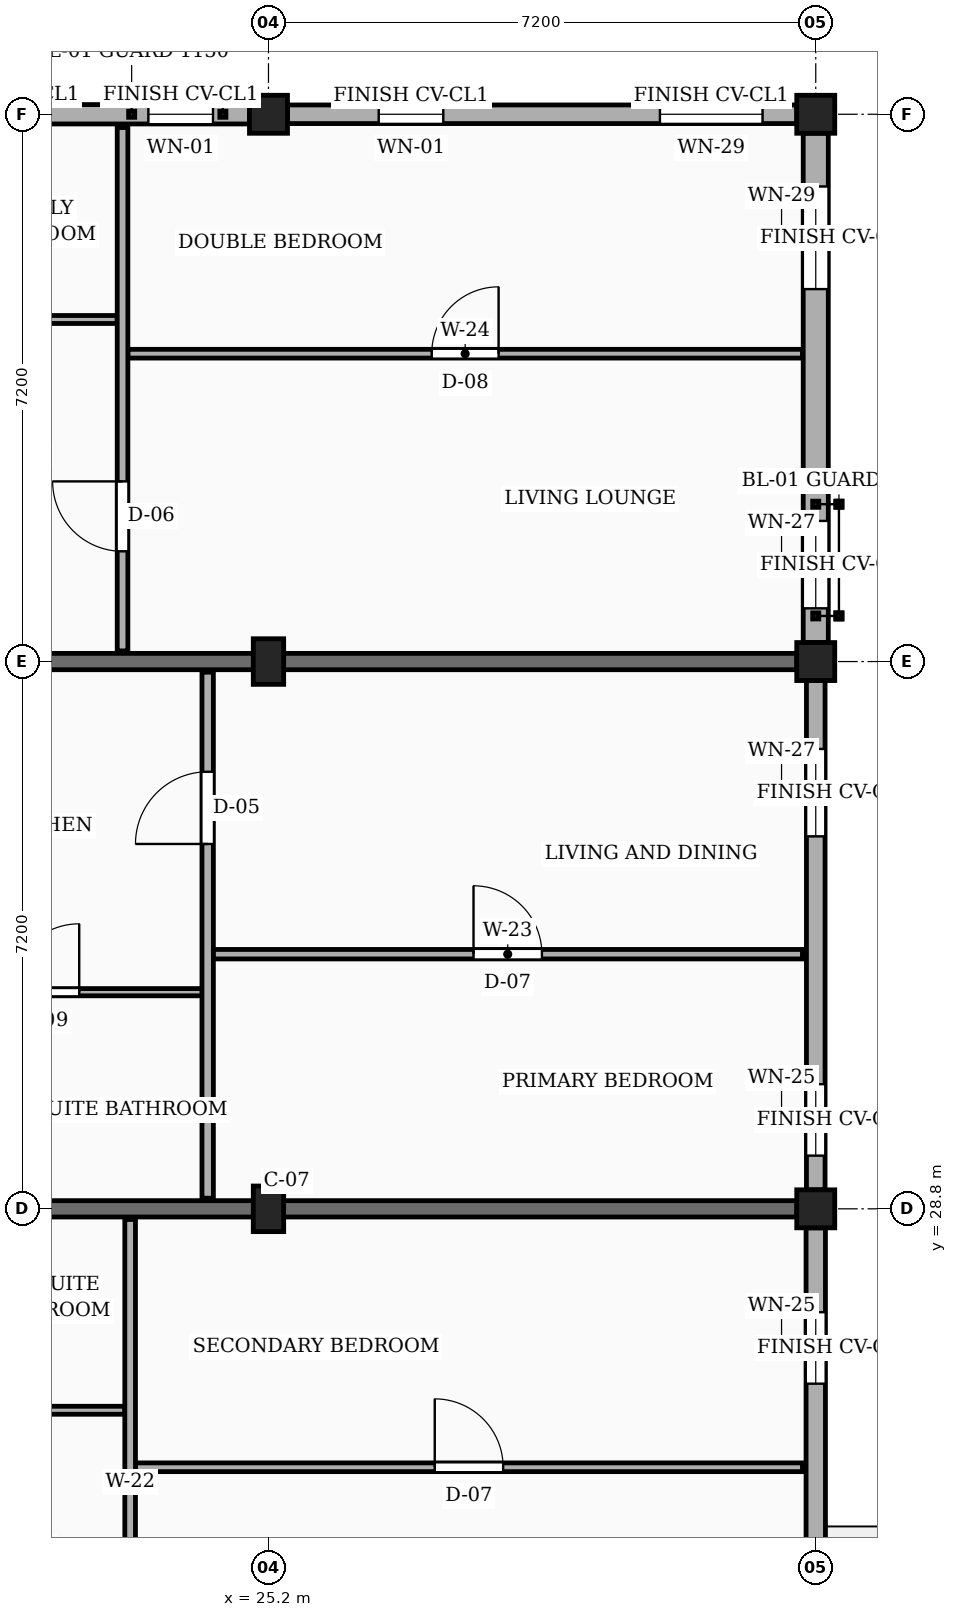
"""IFC4 building model, lengths in metres.
Left out: names, types, materials, properties, quantities, classifications, styles, units other than length and angle.
Written with IfcOpenShell. Run it as: python <this file> out.ifc"""

import sys

from ifc_helpers import new_model, si_unit, direction, frame, frame_2d, origin, origin_2d, place, context, subcontext, project, spatial, rectangle, extrude, element, fill, save


model = new_model("IFC4")
c1 = context("Model", 3, precision=1e-05, world=origin(), true_north=direction((0.0, 1.0)))
c2 = subcontext(c1, "Body", "Model", "MODEL_VIEW")
j1 = project(units=[si_unit("LENGTHUNIT", "METRE"), si_unit("PLANEANGLEUNIT", "RADIAN")], contexts=[c1])
p1 = place(None, origin())
s1 = spatial("IfcSite", under=j1, at=p1, CompositionType="ELEMENT")
p2 = place(p1, origin())
s2 = spatial("IfcBuilding", under=s1, at=p2, CompositionType="ELEMENT")
p3 = place(p2, frame((0.0, 0.0, 32.85)))
s3 = spatial("IfcBuildingStorey", under=s2, at=p3, CompositionType="ELEMENT", Elevation=32.85)
for number, where, z_axis, x_axis in (
    (1, (25.2, 28.8, 0.0), (0.0, 0.0, 1.0), (1.0, 0.0, 0.0)),
    (2, (25.2, 36.0, 0.0), (0.0, 0.0, 1.0), (1.0, 0.0, 0.0)),
):
    element("IfcColumn", number, at=place(p3, frame(where, z_axis=z_axis, x_axis=x_axis)), inside=s3, PredefinedType="COLUMN", context=c2, shape_type="SweptSolid", body=[
        extrude(rectangle(XDim=0.4, YDim=0.6, at=origin_2d()), origin(), (0.0, 0.0, 1.0), 3.15),
    ])
for number, where, z_axis, x_axis in (
    (3, (25.2, 43.2, 0.0), (0.0, 0.0, 1.0), (1.0, 0.0, 0.0)),
    (4, (32.4, 28.8, 0.0), (0.0, 0.0, 1.0), (1.0, 0.0, 0.0)),
    (5, (32.4, 36.0, 0.0), (0.0, 0.0, 1.0), (1.0, 0.0, 0.0)),
    (6, (32.4, 43.2, 0.0), (0.0, 0.0, 1.0), (1.0, 0.0, 0.0)),
):
    element("IfcColumn", number, at=place(p3, frame(where, z_axis=z_axis, x_axis=x_axis)), inside=s3, PredefinedType="COLUMN", context=c2, shape_type="SweptSolid", body=[
        extrude(rectangle(XDim=0.5, YDim=0.5, at=origin_2d()), origin(), (0.0, 0.0, 1.0), 3.15),
    ])
for number, where, z_axis, x_axis in (
    (7, (20.1, 28.8, 0.0), (0.0, 0.0, 1.0), (1.0, 0.0, 0.0)),
    (8, (20.1, 36.0, 0.0), (0.0, 0.0, 1.0), (1.0, 0.0, 0.0)),
):
    element("IfcWall", number, at=place(p3, frame(where, z_axis=z_axis, x_axis=x_axis)), inside=s3, PredefinedType="SOLIDWALL", context=c2, shape_type="SweptSolid", body=[
        extrude(rectangle(XDim=12.05, YDim=0.215, at=frame_2d((6.025, 0.0))), origin(), (0.0, 0.0, 1.0), 2.17),
    ])
p4 = place(p3, frame((32.4, 21.85, 0.0), z_axis=(0.0, 0.0, 1.0), x_axis=(0.0, 1.0, 0.0)))
e9 = element("IfcWall", 9, at=p4, inside=s3, PredefinedType="SOLIDWALL", context=c2, shape_type="SweptSolid", body=[
    extrude(rectangle(XDim=6.7, YDim=0.255, at=frame_2d((3.35, 0.0))), origin(), (0.0, 0.0, 1.0), 2.44),
])
p5 = place(p4, frame((0.45, 0.0, 0.78)))
e10 = element("IfcOpeningElement", 10, at=p5, cuts=e9, PredefinedType="OPENING", context=c2, shape_type="SweptSolid", body=[
    extrude(rectangle(XDim=1.38, YDim=1.36, at=frame_2d((0.69, 0.68))), frame((0.0, 0.137, 0.0), z_axis=(0.0, -1.0, 0.0), x_axis=(1.0, 0.0, 0.0)), (0.0, 0.0, 1.0), 0.275),
])
p6 = place(p4, frame((4.65, 0.0, 0.78)))
e11 = element("IfcOpeningElement", 11, at=p6, cuts=e9, PredefinedType="OPENING", context=c2, shape_type="SweptSolid", body=[
    extrude(rectangle(XDim=0.94, YDim=1.44, at=frame_2d((0.47, 0.72))), frame((0.0, 0.137, 0.0), z_axis=(0.0, -1.0, 0.0), x_axis=(1.0, 0.0, 0.0)), (0.0, 0.0, 1.0), 0.275),
])
p7 = place(p3, frame((32.4, 29.05, 0.0), z_axis=(0.0, 0.0, 1.0), x_axis=(0.0, 1.0, 0.0)))
e12 = element("IfcWall", 12, at=p7, inside=s3, PredefinedType="SOLIDWALL", context=c2, shape_type="SweptSolid", body=[
    extrude(rectangle(XDim=6.7, YDim=0.245, at=frame_2d((3.35, 0.0))), origin(), (0.0, 0.0, 1.0), 2.44),
])
p8 = place(p7, frame((0.45, 0.0, 0.78)))
e13 = element("IfcOpeningElement", 13, at=p8, cuts=e12, PredefinedType="OPENING", context=c2, shape_type="SweptSolid", body=[
    extrude(rectangle(XDim=0.94, YDim=1.44, at=frame_2d((0.47, 0.72))), frame((0.0, 0.133, 0.0), z_axis=(0.0, -1.0, 0.0), x_axis=(1.0, 0.0, 0.0)), (0.0, 0.0, 1.0), 0.265),
])
p9 = place(p7, frame((4.65, 0.0, 0.78)))
e14 = element("IfcOpeningElement", 14, at=p9, cuts=e12, PredefinedType="OPENING", context=c2, shape_type="SweptSolid", body=[
    extrude(rectangle(XDim=1.15, YDim=1.44, at=frame_2d((0.575, 0.72))), frame((0.0, 0.133, 0.0), z_axis=(0.0, -1.0, 0.0), x_axis=(1.0, 0.0, 0.0)), (0.0, 0.0, 1.0), 0.265),
])
p10 = place(p3, frame((32.4, 36.25, 0.0), z_axis=(0.0, 0.0, 1.0), x_axis=(0.0, 1.0, 0.0)))
e15 = element("IfcWall", 15, at=p10, inside=s3, PredefinedType="SOLIDWALL", context=c2, shape_type="SweptSolid", body=[
    extrude(rectangle(XDim=6.7, YDim=0.33, at=frame_2d((3.35, 0.0))), origin(), (0.0, 0.0, 1.0), 2.44),
])
p11 = place(p10, frame((0.45, 0.0, 0.78)))
e16 = element("IfcOpeningElement", 16, at=p11, cuts=e15, PredefinedType="OPENING", context=c2, shape_type="SweptSolid", body=[
    extrude(rectangle(XDim=1.15, YDim=1.44, at=frame_2d((0.575, 0.72))), frame((0.0, 0.175, 0.0), z_axis=(0.0, -1.0, 0.0), x_axis=(1.0, 0.0, 0.0)), (0.0, 0.0, 1.0), 0.35),
])
p12 = place(p10, frame((4.65, 0.0, 0.78)))
e17 = element("IfcOpeningElement", 17, at=p12, cuts=e15, PredefinedType="OPENING", context=c2, shape_type="SweptSolid", body=[
    extrude(rectangle(XDim=1.35, YDim=1.44, at=frame_2d((0.675, 0.72))), frame((0.0, 0.175, 0.0), z_axis=(0.0, -1.0, 0.0), x_axis=(1.0, 0.0, 0.0)), (0.0, 0.0, 1.0), 0.35),
])
p13 = place(p3, frame((32.15, 43.2, 0.0), z_axis=(0.0, 0.0, 1.0), x_axis=(-1.0, 0.0, 0.0)))
e18 = element("IfcWall", 18, at=p13, inside=s3, PredefinedType="SOLIDWALL", context=c2, shape_type="SweptSolid", body=[
    extrude(rectangle(XDim=6.7, YDim=0.245, at=frame_2d((3.35, 0.0))), origin(), (0.0, 0.0, 1.0), 2.44),
])
p14 = place(p13, frame((0.45, 0.0, 0.78)))
e19 = element("IfcOpeningElement", 19, at=p14, cuts=e18, PredefinedType="OPENING", context=c2, shape_type="SweptSolid", body=[
    extrude(rectangle(XDim=1.35, YDim=1.44, at=frame_2d((0.675, 0.72))), frame((0.0, 0.133, 0.0), z_axis=(0.0, -1.0, 0.0), x_axis=(1.0, 0.0, 0.0)), (0.0, 0.0, 1.0), 0.265),
])
p15 = place(p13, frame((4.65, 0.0, 0.78)))
e20 = element("IfcOpeningElement", 20, at=p15, cuts=e18, PredefinedType="OPENING", context=c2, shape_type="SweptSolid", body=[
    extrude(rectangle(XDim=0.85, YDim=1.15, at=frame_2d((0.425, 0.575))), frame((0.0, 0.133, 0.0), z_axis=(0.0, -1.0, 0.0), x_axis=(1.0, 0.0, 0.0)), (0.0, 0.0, 1.0), 0.265),
])
p16 = place(p3, frame((24.95, 43.2, 0.0), z_axis=(0.0, 0.0, 1.0), x_axis=(-1.0, 0.0, 0.0)))
e21 = element("IfcWall", 21, at=p16, inside=s3, PredefinedType="SOLIDWALL", context=c2, shape_type="SweptSolid", body=[
    extrude(rectangle(XDim=6.7, YDim=0.255, at=frame_2d((3.35, 0.0))), origin(), (0.0, 0.0, 1.0), 2.44),
])
p17 = place(p16, frame((0.48, 0.0, 0.78)))
e22 = element("IfcOpeningElement", 22, at=p17, cuts=e21, PredefinedType="OPENING", context=c2, shape_type="SweptSolid", body=[
    extrude(rectangle(XDim=0.85, YDim=1.15, at=frame_2d((0.425, 0.575))), frame((0.0, 0.137, 0.0), z_axis=(0.0, -1.0, 0.0), x_axis=(1.0, 0.0, 0.0)), (0.0, 0.0, 1.0), 0.275),
])
p18 = place(p16, frame((2.76, 0.0, 0.78)))
e23 = element("IfcOpeningElement", 23, at=p18, cuts=e21, PredefinedType="OPENING", context=c2, shape_type="SweptSolid", body=[
    extrude(rectangle(XDim=1.0, YDim=1.15, at=frame_2d((0.5, 0.575))), frame((0.0, 0.137, 0.0), z_axis=(0.0, -1.0, 0.0), x_axis=(1.0, 0.0, 0.0)), (0.0, 0.0, 1.0), 0.275),
])
p19 = place(p16, frame((5.125, 0.0, 0.78)))
e24 = element("IfcOpeningElement", 24, at=p19, cuts=e21, PredefinedType="OPENING", context=c2, shape_type="SweptSolid", body=[
    extrude(rectangle(XDim=1.16, YDim=1.15, at=frame_2d((0.58, 0.575))), frame((0.0, 0.137, 0.0), z_axis=(0.0, -1.0, 0.0), x_axis=(1.0, 0.0, 0.0)), (0.0, 0.0, 1.0), 0.275),
])
p20 = place(p3, frame((23.45, 25.4, 0.0), z_axis=(0.0, 0.0, 1.0), x_axis=(1.0, 0.0, 0.0)))
e25 = element("IfcWall", 25, at=p20, inside=s3, PredefinedType="PARTITIONING", context=c2, shape_type="SweptSolid", body=[
    extrude(rectangle(XDim=8.775, YDim=0.115, at=frame_2d((4.388, 0.0))), origin(), (0.0, 0.0, 1.0), 2.305),
])
p21 = place(p20, frame((3.938, 0.0, 0.0)))
e26 = element("IfcOpeningElement", 26, at=p21, cuts=e25, PredefinedType="OPENING", context=c2, shape_type="SweptSolid", body=[
    extrude(rectangle(XDim=0.9, YDim=2.1, at=frame_2d((0.45, 1.05))), frame((0.0, 0.067, 0.0), z_axis=(0.0, -1.0, 0.0), x_axis=(1.0, 0.0, 0.0)), (0.0, 0.0, 1.0), 0.135),
])
p22 = place(p3, frame((20.19, 26.15, 0.0), z_axis=(0.0, 0.0, 1.0), x_axis=(1.0, 0.0, 0.0)))
e27 = element("IfcWall", 27, at=p22, inside=s3, PredefinedType="PARTITIONING", context=c2, shape_type="SweptSolid", body=[
    extrude(rectangle(XDim=3.12, YDim=0.105, at=frame_2d((1.56, 0.0))), origin(), (0.0, 0.0, 1.0), 2.305),
])
p23 = place(p22, frame((1.11, 0.0, 0.0)))
e28 = element("IfcOpeningElement", 28, at=p23, cuts=e27, PredefinedType="OPENING", context=c2, shape_type="SweptSolid", body=[
    extrude(rectangle(XDim=0.9, YDim=2.05, at=frame_2d((0.45, 1.025))), frame((0.0, 0.062, 0.0), z_axis=(0.0, -1.0, 0.0), x_axis=(1.0, 0.0, 0.0)), (0.0, 0.0, 1.0), 0.125),
])
p24 = place(p3, frame((23.38, 21.74, 0.0), z_axis=(0.0, 0.0, 1.0), x_axis=(0.0, 1.0, 0.0)))
e29 = element("IfcWall", 29, at=p24, inside=s3, PredefinedType="PARTITIONING", context=c2, shape_type="SweptSolid", body=[
    extrude(rectangle(XDim=6.92, YDim=0.14, at=frame_2d((3.46, 0.0))), origin(), (0.0, 0.0, 1.0), 2.305),
])
p25 = place(p24, frame((1.31, 0.0, 0.0)))
e30 = element("IfcOpeningElement", 30, at=p25, cuts=e29, PredefinedType="OPENING", context=c2, shape_type="SweptSolid", body=[
    extrude(rectangle(XDim=0.95, YDim=2.1, at=frame_2d((0.475, 1.05))), frame((0.0, 0.08, 0.0), z_axis=(0.0, -1.0, 0.0), x_axis=(1.0, 0.0, 0.0)), (0.0, 0.0, 1.0), 0.16),
])
p26 = place(p3, frame((24.47, 32.15, 0.0), z_axis=(0.0, 0.0, 1.0), x_axis=(1.0, 0.0, 0.0)))
e31 = element("IfcWall", 31, at=p26, inside=s3, PredefinedType="PARTITIONING", context=c2, shape_type="SweptSolid", body=[
    extrude(rectangle(XDim=7.755, YDim=0.125, at=frame_2d((3.877, 0.0))), origin(), (0.0, 0.0, 1.0), 2.305),
])
p27 = place(p26, frame((3.427, 0.0, 0.0)))
e32 = element("IfcOpeningElement", 32, at=p27, cuts=e31, PredefinedType="OPENING", context=c2, shape_type="SweptSolid", body=[
    extrude(rectangle(XDim=0.9, YDim=2.1, at=frame_2d((0.45, 1.05))), frame((0.0, 0.073, 0.0), z_axis=(0.0, -1.0, 0.0), x_axis=(1.0, 0.0, 0.0)), (0.0, 0.0, 1.0), 0.145),
])
p28 = place(p3, frame((20.19, 31.65, 0.0), z_axis=(0.0, 0.0, 1.0), x_axis=(1.0, 0.0, 0.0)))
e33 = element("IfcWall", 33, at=p28, inside=s3, PredefinedType="PARTITIONING", context=c2, shape_type="SweptSolid", body=[
    extrude(rectangle(XDim=4.14, YDim=0.095, at=frame_2d((2.07, 0.0))), origin(), (0.0, 0.0, 1.0), 2.305),
])
p29 = place(p28, frame((1.62, 0.0, 0.0)))
e34 = element("IfcOpeningElement", 34, at=p29, cuts=e33, PredefinedType="OPENING", context=c2, shape_type="SweptSolid", body=[
    extrude(rectangle(XDim=0.9, YDim=2.05, at=frame_2d((0.45, 1.025))), frame((0.0, 0.058, 0.0), z_axis=(0.0, -1.0, 0.0), x_axis=(1.0, 0.0, 0.0)), (0.0, 0.0, 1.0), 0.115),
])
p30 = place(p3, frame((24.4, 28.94, 0.0), z_axis=(0.0, 0.0, 1.0), x_axis=(0.0, 1.0, 0.0)))
e35 = element("IfcWall", 35, at=p30, inside=s3, PredefinedType="PARTITIONING", context=c2, shape_type="SweptSolid", body=[
    extrude(rectangle(XDim=6.92, YDim=0.15, at=frame_2d((3.46, 0.0))), origin(), (0.0, 0.0, 1.0), 2.305),
])
p31 = place(p30, frame((4.66, 0.0, 0.0)))
e36 = element("IfcOpeningElement", 36, at=p31, cuts=e35, PredefinedType="OPENING", context=c2, shape_type="SweptSolid", body=[
    extrude(rectangle(XDim=0.95, YDim=2.1, at=frame_2d((0.475, 1.05))), frame((0.0, 0.085, 0.0), z_axis=(0.0, -1.0, 0.0), x_axis=(1.0, 0.0, 0.0)), (0.0, 0.0, 1.0), 0.17),
])
p32 = place(p3, frame((23.35, 40.05, 0.0), z_axis=(0.0, 0.0, 1.0), x_axis=(1.0, 0.0, 0.0)))
e37 = element("IfcWall", 37, at=p32, inside=s3, PredefinedType="PARTITIONING", context=c2, shape_type="SweptSolid", body=[
    extrude(rectangle(XDim=8.875, YDim=0.115, at=frame_2d((4.438, 0.0))), origin(), (0.0, 0.0, 1.0), 2.305),
])
p33 = place(p32, frame((3.998, 0.0, 0.0)))
e38 = element("IfcOpeningElement", 38, at=p33, cuts=e37, PredefinedType="OPENING", context=c2, shape_type="SweptSolid", body=[
    extrude(rectangle(XDim=0.88, YDim=2.08, at=frame_2d((0.44, 1.04))), frame((0.0, 0.067, 0.0), z_axis=(0.0, -1.0, 0.0), x_axis=(1.0, 0.0, 0.0)), (0.0, 0.0, 1.0), 0.135),
])
p34 = place(p3, frame((20.19, 40.5, 0.0), z_axis=(0.0, 0.0, 1.0), x_axis=(1.0, 0.0, 0.0)))
e39 = element("IfcWall", 39, at=p34, inside=s3, PredefinedType="PARTITIONING", context=c2, shape_type="SweptSolid", body=[
    extrude(rectangle(XDim=3.02, YDim=0.105, at=frame_2d((1.51, 0.0))), origin(), (0.0, 0.0, 1.0), 2.305),
])
p35 = place(p34, frame((1.075, 0.0, 0.0)))
e40 = element("IfcOpeningElement", 40, at=p35, cuts=e39, PredefinedType="OPENING", context=c2, shape_type="SweptSolid", body=[
    extrude(rectangle(XDim=0.87, YDim=2.05, at=frame_2d((0.435, 1.025))), frame((0.0, 0.062, 0.0), z_axis=(0.0, -1.0, 0.0), x_axis=(1.0, 0.0, 0.0)), (0.0, 0.0, 1.0), 0.125),
])
p36 = place(p3, frame((23.28, 36.14, 0.0), z_axis=(0.0, 0.0, 1.0), x_axis=(0.0, 1.0, 0.0)))
e41 = element("IfcWall", 41, at=p36, inside=s3, PredefinedType="PARTITIONING", context=c2, shape_type="SweptSolid", body=[
    extrude(rectangle(XDim=6.885, YDim=0.14, at=frame_2d((3.442, 0.0))), origin(), (0.0, 0.0, 1.0), 2.305),
])
p37 = place(p36, frame((1.31, 0.0, 0.0)))
e42 = element("IfcOpeningElement", 42, at=p37, cuts=e41, PredefinedType="OPENING", context=c2, shape_type="SweptSolid", body=[
    extrude(rectangle(XDim=0.92, YDim=2.1, at=frame_2d((0.46, 1.05))), frame((0.0, 0.08, 0.0), z_axis=(0.0, -1.0, 0.0), x_axis=(1.0, 0.0, 0.0)), (0.0, 0.0, 1.0), 0.16),
])
p38 = place(p6, origin())
e43 = element("IfcWindow", 43, at=p38, inside=s3, PartitioningType="SINGLE_PANEL", PredefinedType="WINDOW", context=c2, shape_type="SweptSolid", body=[
    extrude(rectangle(XDim=0.94, YDim=1.44, at=frame_2d((0.47, 0.72))), frame((0.0, 0.03, 0.0), z_axis=(0.0, -1.0, 0.0), x_axis=(1.0, 0.0, 0.0)), (0.0, 0.0, 1.0), 0.06),
])
fill(e11, e43)
p39 = place(p8, origin())
e44 = element("IfcWindow", 44, at=p39, inside=s3, PartitioningType="SINGLE_PANEL", PredefinedType="WINDOW", context=c2, shape_type="SweptSolid", body=[
    extrude(rectangle(XDim=0.94, YDim=1.44, at=frame_2d((0.47, 0.72))), frame((0.0, 0.03, 0.0), z_axis=(0.0, -1.0, 0.0), x_axis=(1.0, 0.0, 0.0)), (0.0, 0.0, 1.0), 0.06),
])
fill(e13, e44)
p40 = place(p9, origin())
e45 = element("IfcWindow", 45, at=p40, inside=s3, PartitioningType="SINGLE_PANEL", PredefinedType="WINDOW", context=c2, shape_type="SweptSolid", body=[
    extrude(rectangle(XDim=1.15, YDim=1.44, at=frame_2d((0.575, 0.72))), frame((0.0, 0.03, 0.0), z_axis=(0.0, -1.0, 0.0), x_axis=(1.0, 0.0, 0.0)), (0.0, 0.0, 1.0), 0.06),
])
fill(e14, e45)
p41 = place(p11, origin())
e46 = element("IfcWindow", 46, at=p41, inside=s3, PartitioningType="SINGLE_PANEL", PredefinedType="WINDOW", context=c2, shape_type="SweptSolid", body=[
    extrude(rectangle(XDim=1.15, YDim=1.44, at=frame_2d((0.575, 0.72))), frame((0.0, 0.03, 0.0), z_axis=(0.0, -1.0, 0.0), x_axis=(1.0, 0.0, 0.0)), (0.0, 0.0, 1.0), 0.06),
])
fill(e16, e46)
p42 = place(p12, origin())
e47 = element("IfcWindow", 47, at=p42, inside=s3, PartitioningType="SINGLE_PANEL", PredefinedType="WINDOW", context=c2, shape_type="SweptSolid", body=[
    extrude(rectangle(XDim=1.35, YDim=1.44, at=frame_2d((0.675, 0.72))), frame((0.0, 0.03, 0.0), z_axis=(0.0, -1.0, 0.0), x_axis=(1.0, 0.0, 0.0)), (0.0, 0.0, 1.0), 0.06),
])
fill(e17, e47)
p43 = place(p14, origin())
e48 = element("IfcWindow", 48, at=p43, inside=s3, PartitioningType="SINGLE_PANEL", PredefinedType="WINDOW", context=c2, shape_type="SweptSolid", body=[
    extrude(rectangle(XDim=1.35, YDim=1.44, at=frame_2d((0.675, 0.72))), frame((0.0, 0.03, 0.0), z_axis=(0.0, -1.0, 0.0), x_axis=(1.0, 0.0, 0.0)), (0.0, 0.0, 1.0), 0.06),
])
fill(e19, e48)
p44 = place(p15, origin())
e49 = element("IfcWindow", 49, at=p44, inside=s3, PartitioningType="SINGLE_PANEL", PredefinedType="WINDOW", context=c2, shape_type="SweptSolid", body=[
    extrude(rectangle(XDim=0.85, YDim=1.15, at=frame_2d((0.425, 0.575))), frame((0.0, 0.03, 0.0), z_axis=(0.0, -1.0, 0.0), x_axis=(1.0, 0.0, 0.0)), (0.0, 0.0, 1.0), 0.06),
])
fill(e20, e49)
p45 = place(p17, origin())
e50 = element("IfcWindow", 50, at=p45, inside=s3, PartitioningType="SINGLE_PANEL", PredefinedType="WINDOW", context=c2, shape_type="SweptSolid", body=[
    extrude(rectangle(XDim=0.85, YDim=1.15, at=frame_2d((0.425, 0.575))), frame((0.0, 0.03, 0.0), z_axis=(0.0, -1.0, 0.0), x_axis=(1.0, 0.0, 0.0)), (0.0, 0.0, 1.0), 0.06),
])
fill(e22, e50)
p46 = place(p21, origin())
e51 = element("IfcDoor", 51, at=p46, inside=s3, OperationType="SINGLE_SWING_LEFT", PredefinedType="DOOR", context=c2, shape_type="SweptSolid", body=[
    extrude(rectangle(XDim=0.9, YDim=2.1, at=frame_2d((0.45, 1.05))), frame((0.0, 0.025, 0.0), z_axis=(0.0, -1.0, 0.0), x_axis=(1.0, 0.0, 0.0)), (0.0, 0.0, 1.0), 0.05),
])
fill(e26, e51)
p47 = place(p27, origin())
e52 = element("IfcDoor", 52, at=p47, inside=s3, OperationType="SINGLE_SWING_LEFT", PredefinedType="DOOR", context=c2, shape_type="SweptSolid", body=[
    extrude(rectangle(XDim=0.9, YDim=2.1, at=frame_2d((0.45, 1.05))), frame((0.0, 0.025, 0.0), z_axis=(0.0, -1.0, 0.0), x_axis=(1.0, 0.0, 0.0)), (0.0, 0.0, 1.0), 0.05),
])
fill(e32, e52)
p48 = place(p29, origin())
e53 = element("IfcDoor", 53, at=p48, inside=s3, OperationType="SINGLE_SWING_RIGHT", PredefinedType="DOOR", context=c2, shape_type="SweptSolid", body=[
    extrude(rectangle(XDim=0.9, YDim=2.05, at=frame_2d((0.45, 1.025))), frame((0.0, 0.025, 0.0), z_axis=(0.0, -1.0, 0.0), x_axis=(1.0, 0.0, 0.0)), (0.0, 0.0, 1.0), 0.05),
])
fill(e34, e53)
p49 = place(p31, origin())
e54 = element("IfcDoor", 54, at=p49, inside=s3, OperationType="SINGLE_SWING_LEFT", PredefinedType="DOOR", context=c2, shape_type="SweptSolid", body=[
    extrude(rectangle(XDim=0.95, YDim=2.1, at=frame_2d((0.475, 1.05))), frame((0.0, 0.025, 0.0), z_axis=(0.0, -1.0, 0.0), x_axis=(1.0, 0.0, 0.0)), (0.0, 0.0, 1.0), 0.05),
])
fill(e36, e54)
p50 = place(p33, origin())
e55 = element("IfcDoor", 55, at=p50, inside=s3, OperationType="SINGLE_SWING_RIGHT", PredefinedType="DOOR", context=c2, shape_type="SweptSolid", body=[
    extrude(rectangle(XDim=0.88, YDim=2.08, at=frame_2d((0.44, 1.04))), frame((0.0, 0.025, 0.0), z_axis=(0.0, -1.0, 0.0), x_axis=(1.0, 0.0, 0.0)), (0.0, 0.0, 1.0), 0.05),
])
fill(e38, e55)
p51 = place(p37, origin())
e56 = element("IfcDoor", 56, at=p51, inside=s3, OperationType="SINGLE_SWING_RIGHT", PredefinedType="DOOR", context=c2, shape_type="SweptSolid", body=[
    extrude(rectangle(XDim=0.92, YDim=2.1, at=frame_2d((0.46, 1.05))), frame((0.0, 0.025, 0.0), z_axis=(0.0, -1.0, 0.0), x_axis=(1.0, 0.0, 0.0)), (0.0, 0.0, 1.0), 0.05),
])
fill(e42, e56)
save(model, sys.argv[1])
